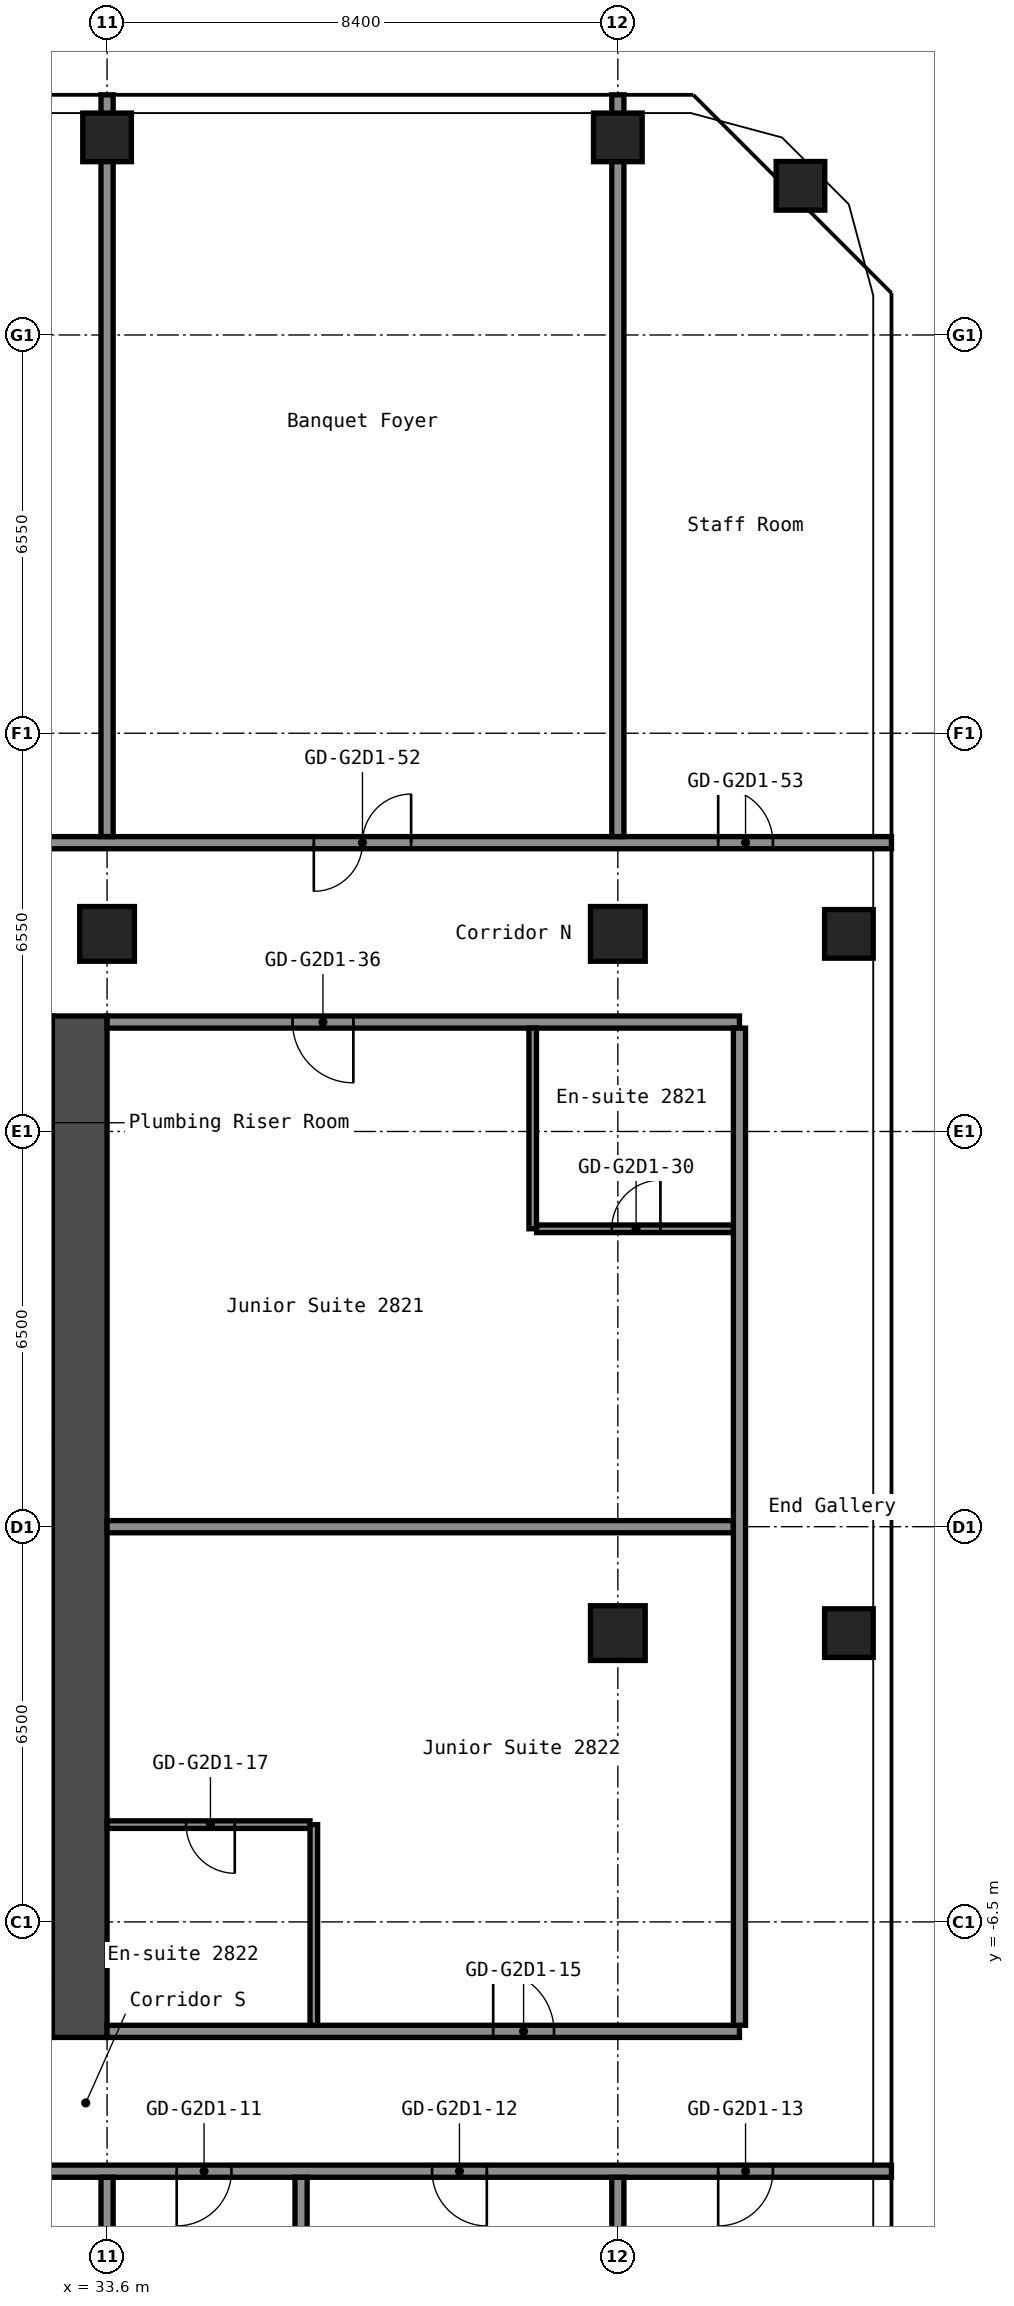
"""IFC4 building model, lengths in metres.
Left out: names, types, materials, properties, quantities, classifications, styles, units other than length and angle.
Written with IfcOpenShell. Run it as: python <this file> out.ifc"""

import sys

from ifc_helpers import new_model, si_unit, direction, frame, frame_2d, origin, origin_2d, place, context, subcontext, project, spatial, rectangle, hollow_rectangle, extrude, element, fill, save


model = new_model("IFC4")
c1 = context("Model", 3, precision=1e-05, world=origin(), true_north=direction((0.0, 1.0)))
c2 = subcontext(c1, "Body", "Model", "MODEL_VIEW")
j1 = project(units=[si_unit("LENGTHUNIT", "METRE"), si_unit("PLANEANGLEUNIT", "RADIAN")], contexts=[c1])
p1 = place(None, origin())
s1 = spatial("IfcSite", under=j1, at=p1, CompositionType="ELEMENT")
p2 = place(p1, origin())
s2 = spatial("IfcBuilding", under=s1, at=p2, CompositionType="ELEMENT")
p3 = place(p2, frame((0.0, 0.0, 101.0)))
s3 = spatial("IfcBuildingStorey", under=s2, at=p3, CompositionType="ELEMENT", Elevation=101.0)
p4 = place(p3, frame((33.6, 9.75, 0.0), z_axis=(0.0, 0.0, 1.0), x_axis=(1.0, 0.0, 0.0)))
e1 = element("IfcColumn", 1, at=p4, inside=s3, PredefinedType="COLUMN", context=c2, shape_type="SweptSolid", body=[
    extrude(hollow_rectangle(XDim=0.9, YDim=0.9, WallThickness=0.036, at=origin_2d()), origin(), (0.0, 0.0, 1.0), 2.8),
])
p5 = place(p3, frame((33.6, 22.85, 0.0), z_axis=(0.0, 0.0, 1.0), x_axis=(1.0, 0.0, 0.0)))
e2 = element("IfcColumn", 2, at=p5, inside=s3, PredefinedType="COLUMN", context=c2, shape_type="SweptSolid", body=[
    extrude(hollow_rectangle(XDim=0.8, YDim=0.8, WallThickness=0.032, at=origin_2d()), origin(), (0.0, 0.0, 1.0), 2.8),
])
for number, where, z_axis, x_axis in (
    (3, (42.0, -1.75, 0.0), (0.0, 0.0, 1.0), (1.0, 0.0, 0.0)),
    (4, (42.0, 9.75, 0.0), (0.0, 0.0, 1.0), (1.0, 0.0, 0.0)),
):
    element("IfcColumn", number, at=place(p3, frame(where, z_axis=z_axis, x_axis=x_axis)), inside=s3, PredefinedType="COLUMN", context=c2, shape_type="SweptSolid", body=[
        extrude(hollow_rectangle(XDim=0.9, YDim=0.9, WallThickness=0.036, at=origin_2d()), origin(), (0.0, 0.0, 1.0), 2.8),
    ])
for number, where, z_axis, x_axis in (
    (5, (42.0, 22.85, 0.0), (0.0, 0.0, 1.0), (1.0, 0.0, 0.0)),
    (6, (45.8, -1.75, 0.0), (0.0, 0.0, 1.0), (1.0, 0.0, 0.0)),
    (7, (45.8, 9.75, 0.0), (0.0, 0.0, 1.0), (1.0, 0.0, 0.0)),
    (8, (45.003, 22.053, 0.0), (0.0, 0.0, 1.0), (1.0, 0.0, 0.0)),
):
    element("IfcColumn", number, at=place(p3, frame(where, z_axis=z_axis, x_axis=x_axis)), inside=s3, PredefinedType="COLUMN", context=c2, shape_type="SweptSolid", body=[
        extrude(hollow_rectangle(XDim=0.8, YDim=0.8, WallThickness=0.032, at=origin_2d()), origin(), (0.0, 0.0, 1.0), 2.8),
    ])
p6 = place(p3, frame((33.15, -8.4, 0.0), z_axis=(0.0, 0.0, 1.0), x_axis=(0.0, 1.0, 0.0)))
e9 = element("IfcWall", 9, at=p6, inside=s3, PredefinedType="SHEAR", context=c2, shape_type="SweptSolid", body=[
    extrude(rectangle(XDim=16.8, YDim=0.9, at=frame_2d((8.4, 0.0))), origin(), (0.0, 0.0, 1.0), 2.8),
])
p7 = place(p3, frame((16.8, -10.6, 0.0), z_axis=(0.0, 0.0, 1.0), x_axis=(1.0, 0.0, 0.0)))
e10 = element("IfcWall", 10, at=p7, inside=s3, PredefinedType="PARTITIONING", context=c2, shape_type="SweptSolid", body=[
    extrude(rectangle(XDim=29.7, YDim=0.2, at=frame_2d((14.85, 0.0))), origin(), (0.0, 0.0, 1.0), 2.8),
])
p8 = place(p7, frame((2.24, 0.0, 0.0)))
e11 = element("IfcOpeningElement", 11, at=p8, cuts=e10, PredefinedType="OPENING", context=c2, shape_type="SweptSolid", body=[
    extrude(rectangle(XDim=0.9, YDim=2.1, at=frame_2d((0.45, 1.05))), frame((0.0, 0.11, 0.0), z_axis=(0.0, -1.0, 0.0), x_axis=(1.0, 0.0, 0.0)), (0.0, 0.0, 1.0), 0.22),
])
p9 = place(p7, frame((6.44, 0.0, 0.0)))
e12 = element("IfcOpeningElement", 12, at=p9, cuts=e10, PredefinedType="OPENING", context=c2, shape_type="SweptSolid", body=[
    extrude(rectangle(XDim=0.9, YDim=2.1, at=frame_2d((0.45, 1.05))), frame((0.0, 0.11, 0.0), z_axis=(0.0, -1.0, 0.0), x_axis=(1.0, 0.0, 0.0)), (0.0, 0.0, 1.0), 0.22),
])
p10 = place(p7, frame((9.8, 0.0, 0.0)))
e13 = element("IfcOpeningElement", 13, at=p10, cuts=e10, PredefinedType="OPENING", context=c2, shape_type="SweptSolid", body=[
    extrude(rectangle(XDim=0.9, YDim=2.1, at=frame_2d((0.45, 1.05))), frame((0.0, 0.11, 0.0), z_axis=(0.0, -1.0, 0.0), x_axis=(1.0, 0.0, 0.0)), (0.0, 0.0, 1.0), 0.22),
])
p11 = place(p7, frame((14.0, 0.0, 0.0)))
e14 = element("IfcOpeningElement", 14, at=p11, cuts=e10, PredefinedType="OPENING", context=c2, shape_type="SweptSolid", body=[
    extrude(rectangle(XDim=0.9, YDim=2.1, at=frame_2d((0.45, 1.05))), frame((0.0, 0.11, 0.0), z_axis=(0.0, -1.0, 0.0), x_axis=(1.0, 0.0, 0.0)), (0.0, 0.0, 1.0), 0.22),
])
p12 = place(p7, frame((17.945, 0.0, 0.0)))
e15 = element("IfcOpeningElement", 15, at=p12, cuts=e10, PredefinedType="OPENING", context=c2, shape_type="SweptSolid", body=[
    extrude(rectangle(XDim=0.9, YDim=2.1, at=frame_2d((0.45, 1.05))), frame((0.0, 0.11, 0.0), z_axis=(0.0, -1.0, 0.0), x_axis=(1.0, 0.0, 0.0)), (0.0, 0.0, 1.0), 0.22),
])
p13 = place(p7, frame((22.145, 0.0, 0.0)))
e16 = element("IfcOpeningElement", 16, at=p13, cuts=e10, PredefinedType="OPENING", context=c2, shape_type="SweptSolid", body=[
    extrude(rectangle(XDim=0.9, YDim=2.1, at=frame_2d((0.45, 1.05))), frame((0.0, 0.11, 0.0), z_axis=(0.0, -1.0, 0.0), x_axis=(1.0, 0.0, 0.0)), (0.0, 0.0, 1.0), 0.22),
])
p14 = place(p7, frame((26.85, 0.0, 0.0)))
e17 = element("IfcOpeningElement", 17, at=p14, cuts=e10, PredefinedType="OPENING", context=c2, shape_type="SweptSolid", body=[
    extrude(rectangle(XDim=0.9, YDim=2.1, at=frame_2d((0.45, 1.05))), frame((0.0, 0.11, 0.0), z_axis=(0.0, -1.0, 0.0), x_axis=(1.0, 0.0, 0.0)), (0.0, 0.0, 1.0), 0.22),
])
p15 = place(p3, frame((33.6, -8.3, 0.0), z_axis=(0.0, 0.0, 1.0), x_axis=(1.0, 0.0, 0.0)))
e18 = element("IfcWall", 18, at=p15, inside=s3, PredefinedType="PARTITIONING", context=c2, shape_type="SweptSolid", body=[
    extrude(rectangle(XDim=10.4, YDim=0.2, at=frame_2d((5.2, 0.0))), origin(), (0.0, 0.0, 1.0), 2.8),
])
p16 = place(p15, frame((6.35, 0.0, 0.0)))
e19 = element("IfcOpeningElement", 19, at=p16, cuts=e18, PredefinedType="OPENING", context=c2, shape_type="SweptSolid", body=[
    extrude(rectangle(XDim=1.0, YDim=2.1, at=frame_2d((0.5, 1.05))), frame((0.0, 0.11, 0.0), z_axis=(0.0, -1.0, 0.0), x_axis=(1.0, 0.0, 0.0)), (0.0, 0.0, 1.0), 0.22),
])
p17 = place(p3, frame((33.6, -4.9, 0.0), z_axis=(0.0, 0.0, 1.0), x_axis=(1.0, 0.0, 0.0)))
e20 = element("IfcWall", 20, at=p17, inside=s3, PredefinedType="PARTITIONING", context=c2, shape_type="SweptSolid", body=[
    extrude(rectangle(XDim=3.337, YDim=0.125, at=frame_2d((1.669, 0.0))), origin(), (0.0, 0.0, 1.0), 2.8),
])
p18 = place(p17, frame((1.3, 0.0, 0.0)))
e21 = element("IfcOpeningElement", 21, at=p18, cuts=e20, PredefinedType="OPENING", context=c2, shape_type="SweptSolid", body=[
    extrude(rectangle(XDim=0.8, YDim=2.1, at=frame_2d((0.4, 1.05))), frame((0.0, 0.073, 0.0), z_axis=(0.0, -1.0, 0.0), x_axis=(1.0, 0.0, 0.0)), (0.0, 0.0, 1.0), 0.145),
])
p19 = place(p3, frame((33.6, 0.0, 0.0), z_axis=(0.0, 0.0, 1.0), x_axis=(1.0, 0.0, 0.0)))
e22 = element("IfcWall", 22, at=p19, inside=s3, PredefinedType="PARTITIONING", context=c2, shape_type="SweptSolid", body=[
    extrude(rectangle(XDim=10.3, YDim=0.2, at=frame_2d((5.15, 0.0))), origin(), (0.0, 0.0, 1.0), 2.8),
])
p20 = place(p3, frame((40.663, 4.9, 0.0), z_axis=(0.0, 0.0, 1.0), x_axis=(1.0, 0.0, 0.0)))
e23 = element("IfcWall", 23, at=p20, inside=s3, PredefinedType="PARTITIONING", context=c2, shape_type="SweptSolid", body=[
    extrude(rectangle(XDim=3.237, YDim=0.125, at=frame_2d((1.619, 0.0))), origin(), (0.0, 0.0, 1.0), 2.8),
])
p21 = place(p20, frame((1.238, 0.0, 0.0)))
e24 = element("IfcOpeningElement", 24, at=p21, cuts=e23, PredefinedType="OPENING", context=c2, shape_type="SweptSolid", body=[
    extrude(rectangle(XDim=0.8, YDim=2.1, at=frame_2d((0.4, 1.05))), frame((0.0, 0.073, 0.0), z_axis=(0.0, -1.0, 0.0), x_axis=(1.0, 0.0, 0.0)), (0.0, 0.0, 1.0), 0.145),
])
p22 = place(p3, frame((33.6, 8.3, 0.0), z_axis=(0.0, 0.0, 1.0), x_axis=(1.0, 0.0, 0.0)))
e25 = element("IfcWall", 25, at=p22, inside=s3, PredefinedType="PARTITIONING", context=c2, shape_type="SweptSolid", body=[
    extrude(rectangle(XDim=10.4, YDim=0.2, at=frame_2d((5.2, 0.0))), origin(), (0.0, 0.0, 1.0), 2.8),
])
p23 = place(p22, frame((3.05, 0.0, 0.0)))
e26 = element("IfcOpeningElement", 26, at=p23, cuts=e25, PredefinedType="OPENING", context=c2, shape_type="SweptSolid", body=[
    extrude(rectangle(XDim=1.0, YDim=2.1, at=frame_2d((0.5, 1.05))), frame((0.0, 0.11, 0.0), z_axis=(0.0, -1.0, 0.0), x_axis=(1.0, 0.0, 0.0)), (0.0, 0.0, 1.0), 0.22),
])
p24 = place(p3, frame((16.8, 11.25, 0.0), z_axis=(0.0, 0.0, 1.0), x_axis=(1.0, 0.0, 0.0)))
e27 = element("IfcWall", 27, at=p24, inside=s3, PredefinedType="PARTITIONING", context=c2, shape_type="SweptSolid", body=[
    extrude(rectangle(XDim=29.7, YDim=0.2, at=frame_2d((14.85, 0.0))), origin(), (0.0, 0.0, 1.0), 2.8),
])
p25 = place(p24, frame((3.4, 0.0, 0.0)))
e28 = element("IfcOpeningElement", 28, at=p25, cuts=e27, PredefinedType="OPENING", context=c2, shape_type="SweptSolid", body=[
    extrude(rectangle(XDim=1.6, YDim=2.1, at=frame_2d((0.8, 1.05))), frame((0.0, 0.11, 0.0), z_axis=(0.0, -1.0, 0.0), x_axis=(1.0, 0.0, 0.0)), (0.0, 0.0, 1.0), 0.22),
])
p26 = place(p24, frame((11.8, 0.0, 0.0)))
e29 = element("IfcOpeningElement", 29, at=p26, cuts=e27, PredefinedType="OPENING", context=c2, shape_type="SweptSolid", body=[
    extrude(rectangle(XDim=1.6, YDim=2.1, at=frame_2d((0.8, 1.05))), frame((0.0, 0.11, 0.0), z_axis=(0.0, -1.0, 0.0), x_axis=(1.0, 0.0, 0.0)), (0.0, 0.0, 1.0), 0.22),
])
p27 = place(p24, frame((20.2, 0.0, 0.0)))
e30 = element("IfcOpeningElement", 30, at=p27, cuts=e27, PredefinedType="OPENING", context=c2, shape_type="SweptSolid", body=[
    extrude(rectangle(XDim=1.6, YDim=2.1, at=frame_2d((0.8, 1.05))), frame((0.0, 0.11, 0.0), z_axis=(0.0, -1.0, 0.0), x_axis=(1.0, 0.0, 0.0)), (0.0, 0.0, 1.0), 0.22),
])
p28 = place(p24, frame((26.85, 0.0, 0.0)))
e31 = element("IfcOpeningElement", 31, at=p28, cuts=e27, PredefinedType="OPENING", context=c2, shape_type="SweptSolid", body=[
    extrude(rectangle(XDim=0.9, YDim=2.1, at=frame_2d((0.45, 1.05))), frame((0.0, 0.11, 0.0), z_axis=(0.0, -1.0, 0.0), x_axis=(1.0, 0.0, 0.0)), (0.0, 0.0, 1.0), 0.22),
])
p29 = place(p3, frame((33.6, -15.55, 0.0), z_axis=(0.0, 0.0, 1.0), x_axis=(0.0, 1.0, 0.0)))
e32 = element("IfcWall", 32, at=p29, inside=s3, PredefinedType="PARTITIONING", context=c2, shape_type="SweptSolid", body=[
    extrude(rectangle(XDim=4.85, YDim=0.2, at=frame_2d((2.425, 0.0))), origin(), (0.0, 0.0, 1.0), 2.8),
])
p30 = place(p3, frame((33.6, 11.35, 0.0), z_axis=(0.0, 0.0, 1.0), x_axis=(0.0, 1.0, 0.0)))
e33 = element("IfcWall", 33, at=p30, inside=s3, PredefinedType="PARTITIONING", context=c2, shape_type="SweptSolid", body=[
    extrude(rectangle(XDim=12.2, YDim=0.2, at=frame_2d((6.1, 0.0))), origin(), (0.0, 0.0, 1.0), 2.8),
])
p31 = place(p3, frame((36.79, -15.55, 0.0), z_axis=(0.0, 0.0, 1.0), x_axis=(0.0, 1.0, 0.0)))
e34 = element("IfcWall", 34, at=p31, inside=s3, PredefinedType="PARTITIONING", context=c2, shape_type="SweptSolid", body=[
    extrude(rectangle(XDim=4.85, YDim=0.2, at=frame_2d((2.425, 0.0))), origin(), (0.0, 0.0, 1.0), 2.8),
])
for number, where, z_axis, x_axis in (
    (35, (37.0, -8.2, 0.0), (0.0, 0.0, 1.0), (0.0, 1.0, 0.0)),
    (36, (40.6, 4.9, 0.0), (0.0, 0.0, 1.0), (0.0, 1.0, 0.0)),
):
    element("IfcWall", number, at=place(p3, frame(where, z_axis=z_axis, x_axis=x_axis)), inside=s3, PredefinedType="PARTITIONING", context=c2, shape_type="SweptSolid", body=[
        extrude(rectangle(XDim=3.3, YDim=0.125, at=frame_2d((1.65, 0.0))), origin(), (0.0, 0.0, 1.0), 2.8),
    ])
p32 = place(p3, frame((42.0, -15.55, 0.0), z_axis=(0.0, 0.0, 1.0), x_axis=(0.0, 1.0, 0.0)))
e37 = element("IfcWall", 37, at=p32, inside=s3, PredefinedType="PARTITIONING", context=c2, shape_type="SweptSolid", body=[
    extrude(rectangle(XDim=4.85, YDim=0.2, at=frame_2d((2.425, 0.0))), origin(), (0.0, 0.0, 1.0), 2.8),
])
p33 = place(p3, frame((42.0, 11.35, 0.0), z_axis=(0.0, 0.0, 1.0), x_axis=(0.0, 1.0, 0.0)))
e38 = element("IfcWall", 38, at=p33, inside=s3, PredefinedType="PARTITIONING", context=c2, shape_type="SweptSolid", body=[
    extrude(rectangle(XDim=12.2, YDim=0.2, at=frame_2d((6.1, 0.0))), origin(), (0.0, 0.0, 1.0), 2.8),
])
p34 = place(p3, frame((44.0, -8.2, 0.0), z_axis=(0.0, 0.0, 1.0), x_axis=(0.0, 1.0, 0.0)))
e39 = element("IfcWall", 39, at=p34, inside=s3, PredefinedType="PARTITIONING", context=c2, shape_type="SweptSolid", body=[
    extrude(rectangle(XDim=16.4, YDim=0.2, at=frame_2d((8.2, 0.0))), origin(), (0.0, 0.0, 1.0), 2.8),
])
p35 = place(p12, origin())
e40 = element("IfcDoor", 40, at=p35, inside=s3, OperationType="SINGLE_SWING_LEFT", PredefinedType="DOOR", context=c2, shape_type="SweptSolid", body=[
    extrude(rectangle(XDim=0.9, YDim=2.1, at=frame_2d((0.45, 1.05))), frame((0.0, 0.025, 0.0), z_axis=(0.0, -1.0, 0.0), x_axis=(1.0, 0.0, 0.0)), (0.0, 0.0, 1.0), 0.05),
])
fill(e15, e40)
p36 = place(p13, origin())
e41 = element("IfcDoor", 41, at=p36, inside=s3, OperationType="SINGLE_SWING_RIGHT", PredefinedType="DOOR", context=c2, shape_type="SweptSolid", body=[
    extrude(rectangle(XDim=0.9, YDim=2.1, at=frame_2d((0.45, 1.05))), frame((0.0, 0.025, 0.0), z_axis=(0.0, -1.0, 0.0), x_axis=(1.0, 0.0, 0.0)), (0.0, 0.0, 1.0), 0.05),
])
fill(e16, e41)
p37 = place(p14, origin())
e42 = element("IfcDoor", 42, at=p37, inside=s3, OperationType="SINGLE_SWING_LEFT", PredefinedType="DOOR", context=c2, shape_type="SweptSolid", body=[
    extrude(rectangle(XDim=0.9, YDim=2.1, at=frame_2d((0.45, 1.05))), frame((0.0, 0.025, 0.0), z_axis=(0.0, -1.0, 0.0), x_axis=(1.0, 0.0, 0.0)), (0.0, 0.0, 1.0), 0.05),
])
fill(e17, e42)
p38 = place(p16, origin())
e43 = element("IfcDoor", 43, at=p38, inside=s3, OperationType="SINGLE_SWING_RIGHT", PredefinedType="DOOR", context=c2, shape_type="SweptSolid", body=[
    extrude(rectangle(XDim=1.0, YDim=2.1, at=frame_2d((0.5, 1.05))), frame((0.0, 0.025, 0.0), z_axis=(0.0, -1.0, 0.0), x_axis=(1.0, 0.0, 0.0)), (0.0, 0.0, 1.0), 0.05),
])
fill(e19, e43)
p39 = place(p18, origin())
e44 = element("IfcDoor", 44, at=p39, inside=s3, OperationType="SINGLE_SWING_RIGHT", PredefinedType="DOOR", context=c2, shape_type="SweptSolid", body=[
    extrude(rectangle(XDim=0.8, YDim=2.1, at=frame_2d((0.4, 1.05))), frame((0.0, 0.025, 0.0), z_axis=(0.0, -1.0, 0.0), x_axis=(1.0, 0.0, 0.0)), (0.0, 0.0, 1.0), 0.05),
])
fill(e21, e44)
p40 = place(p21, origin())
e45 = element("IfcDoor", 45, at=p40, inside=s3, OperationType="SINGLE_SWING_LEFT", PredefinedType="DOOR", context=c2, shape_type="SweptSolid", body=[
    extrude(rectangle(XDim=0.8, YDim=2.1, at=frame_2d((0.4, 1.05))), frame((0.0, 0.025, 0.0), z_axis=(0.0, -1.0, 0.0), x_axis=(1.0, 0.0, 0.0)), (0.0, 0.0, 1.0), 0.05),
])
fill(e24, e45)
p41 = place(p23, origin())
e46 = element("IfcDoor", 46, at=p41, inside=s3, OperationType="SINGLE_SWING_RIGHT", PredefinedType="DOOR", context=c2, shape_type="SweptSolid", body=[
    extrude(rectangle(XDim=1.0, YDim=2.1, at=frame_2d((0.5, 1.05))), frame((0.0, 0.025, 0.0), z_axis=(0.0, -1.0, 0.0), x_axis=(1.0, 0.0, 0.0)), (0.0, 0.0, 1.0), 0.05),
])
fill(e26, e46)
p42 = place(p27, origin())
e47 = element("IfcDoor", 47, at=p42, inside=s3, OperationType="DOUBLE_DOOR_SINGLE_SWING", PredefinedType="DOOR", context=c2, shape_type="SweptSolid", body=[
    extrude(rectangle(XDim=1.6, YDim=2.1, at=frame_2d((0.8, 1.05))), frame((0.0, 0.025, 0.0), z_axis=(0.0, -1.0, 0.0), x_axis=(1.0, 0.0, 0.0)), (0.0, 0.0, 1.0), 0.05),
])
fill(e30, e47)
p43 = place(p28, origin())
e48 = element("IfcDoor", 48, at=p43, inside=s3, OperationType="SINGLE_SWING_RIGHT", PredefinedType="DOOR", context=c2, shape_type="SweptSolid", body=[
    extrude(rectangle(XDim=0.9, YDim=2.1, at=frame_2d((0.45, 1.05))), frame((0.0, 0.025, 0.0), z_axis=(0.0, -1.0, 0.0), x_axis=(1.0, 0.0, 0.0)), (0.0, 0.0, 1.0), 0.05),
])
fill(e31, e48)
save(model, sys.argv[1])
